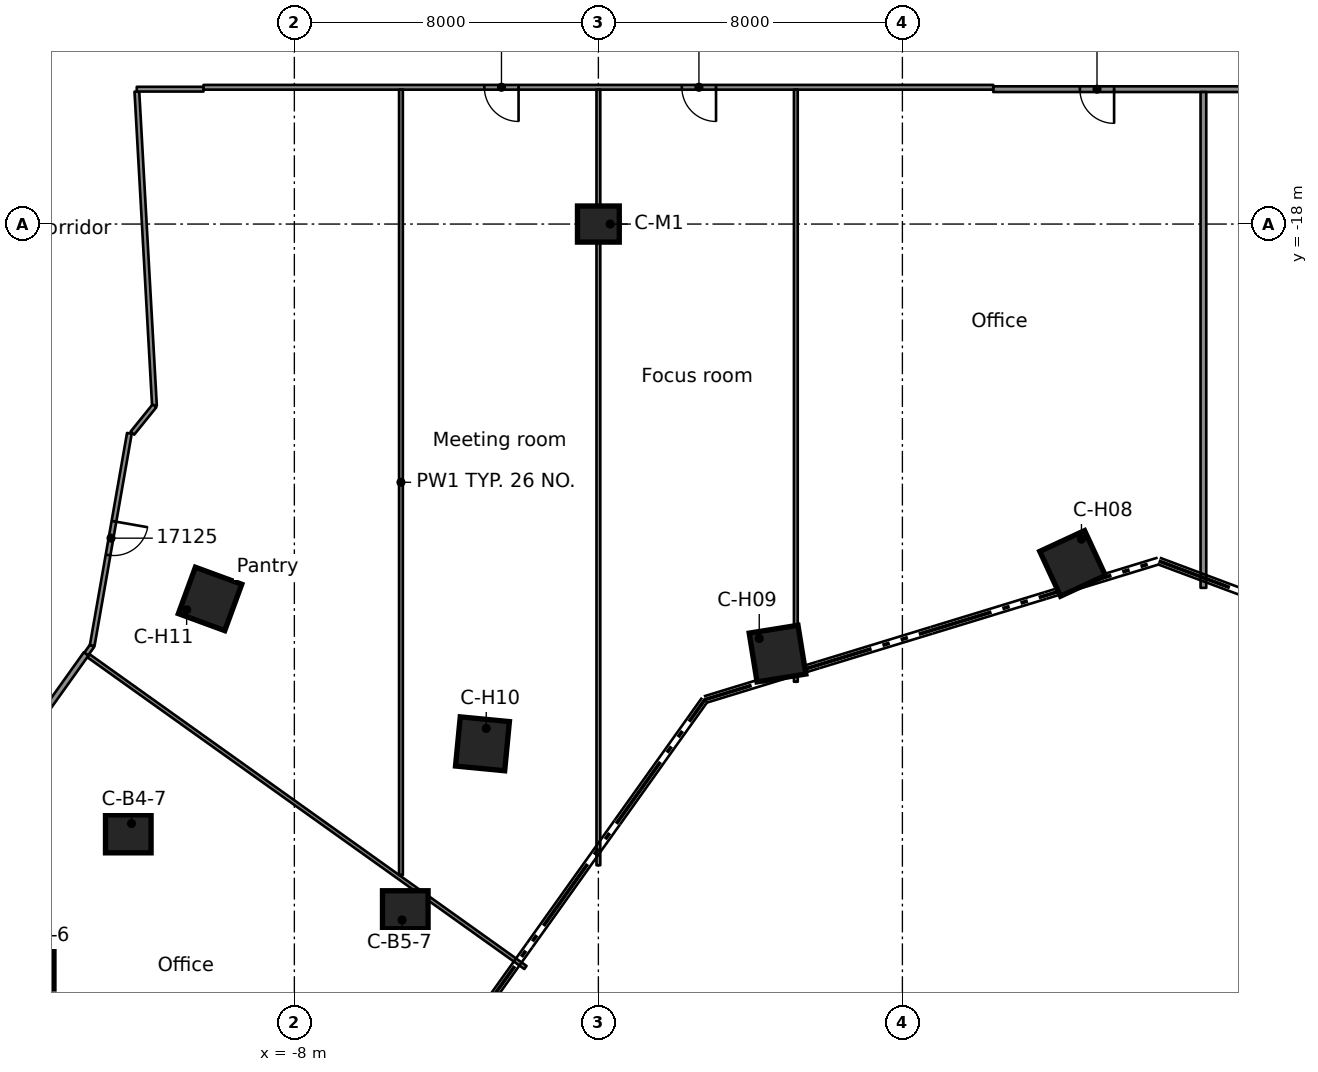
"""IFC4 building model, lengths in metres.
Left out: names, types, materials, properties, quantities, classifications, styles, units other than length and angle.
Written with IfcOpenShell. Run it as: python <this file> out.ifc"""

import sys

from ifc_helpers import new_model, si_unit, direction, frame, frame_2d, origin, origin_2d, place, context, subcontext, project, spatial, rectangle, extrude, element, fill, save


model = new_model("IFC4")
c1 = context("Model", 3, precision=1e-05, world=origin(), true_north=direction((0.0, 1.0)))
c2 = subcontext(c1, "Body", "Model", "MODEL_VIEW")
j1 = project(units=[si_unit("LENGTHUNIT", "METRE"), si_unit("PLANEANGLEUNIT", "RADIAN")], contexts=[c1])
p1 = place(None, origin())
s1 = spatial("IfcSite", under=j1, at=p1, CompositionType="ELEMENT")
p2 = place(p1, origin())
s2 = spatial("IfcBuilding", under=s1, at=p2, CompositionType="ELEMENT")
p3 = place(p2, frame((0.0, 0.0, 84.2)))
s3 = spatial("IfcBuildingStorey", under=s2, at=p3, CompositionType="ELEMENT", Elevation=84.2)
for number, where, z_axis, x_axis in (
    (1, (-14.925, -37.628, 0.0), (0.0, 0.0, 1.0), (1.0, 0.0, 0.0)),
    (2, (-12.37, -34.045, 0.0), (0.0, 0.0, 1.0), (1.0, 0.0, 0.0)),
    (3, (-5.081, -36.042, 0.0), (0.0, 0.0, 1.0), (1.0, 0.0, 0.0)),
):
    element("IfcColumn", number, at=place(p3, frame(where, z_axis=z_axis, x_axis=x_axis)), inside=s3, PredefinedType="COLUMN", context=c2, shape_type="SweptSolid", body=[
        extrude(rectangle(XDim=1.2, YDim=1.0, at=origin_2d()), origin(), (0.0, 0.0, 1.0), 3.5),
    ])
for number, where, z_axis, x_axis in (
    (4, (12.478, -26.929, 0.0), (0.0, 0.0, 1.0), (0.42, -0.907, 0.0)),
    (5, (4.714, -29.302, 0.0), (0.0, 0.0, 1.0), (0.159, -0.987, 0.0)),
    (6, (-3.05, -31.676, 0.0), (0.0, 0.0, 1.0), (-0.096, -0.995, 0.0)),
    (7, (-10.218, -27.864, 0.0), (0.0, 0.0, 1.0), (-0.344, -0.939, 0.0)),
):
    element("IfcColumn", number, at=place(p3, frame(where, z_axis=z_axis, x_axis=x_axis)), inside=s3, PredefinedType="COLUMN", context=c2, shape_type="SweptSolid", body=[
        extrude(rectangle(XDim=1.3, YDim=1.3, at=origin_2d()), origin(), (0.0, 0.0, 1.0), 3.5),
    ])
p4 = place(p3, frame((0.0, -18.0, 0.0), z_axis=(0.0, 0.0, 1.0), x_axis=(1.0, 0.0, 0.0)))
e8 = element("IfcColumn", 8, at=p4, inside=s3, PredefinedType="COLUMN", context=c2, shape_type="SweptSolid", body=[
    extrude(rectangle(XDim=1.1, YDim=0.95, at=origin_2d()), origin(), (0.0, 0.0, 1.0), 3.5),
])
p5 = place(p3, frame((-12.144, -14.513, 0.0), z_axis=(0.0, 0.0, 1.0), x_axis=(0.055914043425, -0.998435586179, 0.0)))
e9 = element("IfcWall", 9, at=p5, inside=s3, PredefinedType="PARTITIONING", context=c2, shape_type="SweptSolid", body=[
    extrude(rectangle(XDim=8.283, YDim=0.125, at=frame_2d((4.142, 0.0))), origin(), (0.0, 0.0, 1.0), 3.08),
])
p6 = place(p3, frame((-19.403, -37.75, 0.0), z_axis=(0.0, 0.0, 1.0), x_axis=(0.814124535662, -0.580690313707, 0.0)))
e10 = element("IfcWall", 10, at=p6, inside=s3, PredefinedType="PARTITIONING", context=c2, shape_type="SweptSolid", body=[
    extrude(rectangle(XDim=14.125, YDim=0.15, at=frame_2d((7.062, 0.0))), origin(), (0.0, 0.0, 1.0), 3.08),
])
p7 = place(p3, frame((-13.417, -29.359, 0.0), z_axis=(0.0, 0.0, 1.0), x_axis=(0.814093047319, -0.580734457655, 0.0)))
e11 = element("IfcWall", 11, at=p7, inside=s3, PredefinedType="PARTITIONING", context=c2, shape_type="SweptSolid", body=[
    extrude(rectangle(XDim=14.124, YDim=0.1, at=frame_2d((7.062, 0.0))), origin(), (0.0, 0.0, 1.0), 3.08),
])
p8 = place(p3, frame((-12.147, -14.451, 0.0), z_axis=(0.0, 0.0, 1.0), x_axis=(1.0, 0.0, 0.0)))
e12 = element("IfcWall", 12, at=p8, inside=s3, PredefinedType="PARTITIONING", context=c2, shape_type="SweptSolid", body=[
    extrude(rectangle(XDim=1.756, YDim=0.125, at=frame_2d((0.878, 0.0))), origin(), (0.0, 0.0, 1.0), 3.08),
])
p9 = place(p3, frame((21.375, -14.451, 0.0), z_axis=(0.0, 0.0, 1.0), x_axis=(-1.0, 0.0, 0.0)))
e13 = element("IfcWall", 13, at=p9, inside=s3, PredefinedType="PARTITIONING", context=c2, shape_type="SweptSolid", body=[
    extrude(rectangle(XDim=10.984, YDim=0.15, at=frame_2d((5.492, 0.0))), origin(), (0.0, 0.0, 1.0), 3.08),
])
p10 = place(p9, frame((7.804, 0.0, 0.0)))
e14 = element("IfcOpeningElement", 14, at=p10, cuts=e13, PredefinedType="OPENING", context=c2, shape_type="SweptSolid", body=[
    extrude(rectangle(XDim=0.9, YDim=2.1, at=frame_2d((0.45, 1.05))), frame((0.0, 0.085, 0.0), z_axis=(0.0, -1.0, 0.0), x_axis=(1.0, 0.0, 0.0)), (0.0, 0.0, 1.0), 0.17),
])
p11 = place(p9, frame((2.275, 0.0, 0.0)))
e15 = element("IfcOpeningElement", 15, at=p11, cuts=e13, PredefinedType="OPENING", context=c2, shape_type="SweptSolid", body=[
    extrude(rectangle(XDim=0.9, YDim=2.1, at=frame_2d((0.45, 1.05))), frame((0.0, 0.085, 0.0), z_axis=(0.0, -1.0, 0.0), x_axis=(1.0, 0.0, 0.0)), (0.0, 0.0, 1.0), 0.17),
])
p12 = place(p3, frame((10.391, -14.401, 0.0), z_axis=(0.0, 0.0, 1.0), x_axis=(-1.0, 0.0, 0.0)))
e16 = element("IfcWall", 16, at=p12, inside=s3, PredefinedType="PARTITIONING", context=c2, shape_type="SweptSolid", body=[
    extrude(rectangle(XDim=20.781, YDim=0.125, at=frame_2d((10.391, 0.0))), origin(), (0.0, 0.0, 1.0), 3.08),
])
p13 = place(p12, frame((12.491, 0.0, 0.0)))
e17 = element("IfcOpeningElement", 17, at=p13, cuts=e16, PredefinedType="OPENING", context=c2, shape_type="SweptSolid", body=[
    extrude(rectangle(XDim=0.9, YDim=2.1, at=frame_2d((0.45, 1.05))), frame((0.0, 0.073, 0.0), z_axis=(0.0, -1.0, 0.0), x_axis=(1.0, 0.0, 0.0)), (0.0, 0.0, 1.0), 0.145),
])
p14 = place(p12, frame((7.295, 0.0, 0.0)))
e18 = element("IfcOpeningElement", 18, at=p14, cuts=e16, PredefinedType="OPENING", context=c2, shape_type="SweptSolid", body=[
    extrude(rectangle(XDim=0.9, YDim=2.1, at=frame_2d((0.45, 1.05))), frame((0.0, 0.073, 0.0), z_axis=(0.0, -1.0, 0.0), x_axis=(1.0, 0.0, 0.0)), (0.0, 0.0, 1.0), 0.145),
])
p15 = place(p3, frame((-12.262, -23.502, 0.0), z_axis=(0.0, 0.0, 1.0), x_axis=(0.628552238649, 0.777767370934, 0.0)))
e19 = element("IfcWall", 19, at=p15, inside=s3, PredefinedType="PARTITIONING", context=c2, shape_type="SweptSolid", body=[
    extrude(rectangle(XDim=0.924, YDim=0.125, at=frame_2d((0.462, 0.0))), origin(), (0.0, 0.0, 1.0), 3.08),
])
p16 = place(p3, frame((-13.478, -29.315, 0.0), z_axis=(0.0, 0.0, 1.0), x_axis=(0.581578261401, 0.813490458374, 0.0)))
e20 = element("IfcWall", 20, at=p16, inside=s3, PredefinedType="PARTITIONING", context=c2, shape_type="SweptSolid", body=[
    extrude(rectangle(XDim=0.271, YDim=0.125, at=frame_2d((0.136, 0.0))), origin(), (0.0, 0.0, 1.0), 3.08),
])
p17 = place(p3, frame((-13.48, -29.312, 0.0), z_axis=(0.0, 0.0, 1.0), x_axis=(-0.580603145907, -0.814186702767, 0.0)))
e21 = element("IfcWall", 21, at=p17, inside=s3, PredefinedType="PARTITIONING", context=c2, shape_type="SweptSolid", body=[
    extrude(rectangle(XDim=24.809, YDim=0.15, at=frame_2d((12.404, 0.0))), origin(), (0.0, 0.0, 1.0), 3.08),
])
p18 = place(p17, frame((4.601, 0.0, 0.0)))
e22 = element("IfcOpeningElement", 22, at=p18, cuts=e21, PredefinedType="OPENING", context=c2, shape_type="SweptSolid", body=[
    extrude(rectangle(XDim=0.9, YDim=2.1, at=frame_2d((0.45, 1.05))), frame((0.0, 0.085, 0.0), z_axis=(0.0, -1.0, 0.0), x_axis=(1.0, 0.0, 0.0)), (0.0, 0.0, 1.0), 0.17),
])
p19 = place(p17, frame((13.408, 0.0, 0.0)))
e23 = element("IfcOpeningElement", 23, at=p19, cuts=e21, PredefinedType="OPENING", context=c2, shape_type="SweptSolid", body=[
    extrude(rectangle(XDim=0.9, YDim=2.1, at=frame_2d((0.45, 1.05))), frame((0.0, 0.085, 0.0), z_axis=(0.0, -1.0, 0.0), x_axis=(1.0, 0.0, 0.0)), (0.0, 0.0, 1.0), 0.17),
])
p20 = place(p17, frame((19.4, 0.0, 0.0)))
e24 = element("IfcOpeningElement", 24, at=p20, cuts=e21, PredefinedType="OPENING", context=c2, shape_type="SweptSolid", body=[
    extrude(rectangle(XDim=0.9, YDim=2.1, at=frame_2d((0.45, 1.05))), frame((0.0, 0.085, 0.0), z_axis=(0.0, -1.0, 0.0), x_axis=(1.0, 0.0, 0.0)), (0.0, 0.0, 1.0), 0.17),
])
p21 = place(p3, frame((-12.341, -23.507, 0.0), z_axis=(0.0, 0.0, 1.0), x_axis=(-0.172630951449, -0.984986575849, 0.0)))
e25 = element("IfcWall", 25, at=p21, inside=s3, PredefinedType="PARTITIONING", context=c2, shape_type="SweptSolid", body=[
    extrude(rectangle(XDim=5.671, YDim=0.125, at=frame_2d((2.835, 0.0))), origin(), (0.0, 0.0, 1.0), 3.08),
])
p22 = place(p21, frame((2.35, 0.0, 0.0)))
e26 = element("IfcOpeningElement", 26, at=p22, cuts=e25, PredefinedType="OPENING", context=c2, shape_type="SweptSolid", body=[
    extrude(rectangle(XDim=0.9, YDim=2.1, at=frame_2d((0.45, 1.05))), frame((0.0, 0.073, 0.0), z_axis=(0.0, -1.0, 0.0), x_axis=(1.0, 0.0, 0.0)), (0.0, 0.0, 1.0), 0.145),
])
p23 = place(p3, frame((15.921, -27.572, 0.0), z_axis=(0.0, 0.0, 1.0), x_axis=(0.0, 1.0, 0.0)))
e27 = element("IfcWall", 27, at=p23, inside=s3, PredefinedType="PARTITIONING", context=c2, shape_type="SweptSolid", body=[
    extrude(rectangle(XDim=13.046, YDim=0.15, at=frame_2d((6.523, 0.0))), origin(), (0.0, 0.0, 1.0), 3.08),
])
p24 = place(p3, frame((5.196, -30.043, 0.0), z_axis=(0.0, 0.0, 1.0), x_axis=(0.0, 1.0, 0.0)))
e28 = element("IfcWall", 28, at=p24, inside=s3, PredefinedType="PARTITIONING", context=c2, shape_type="SweptSolid", body=[
    extrude(rectangle(XDim=15.58, YDim=0.1, at=frame_2d((7.79, 0.0))), origin(), (0.0, 0.0, 1.0), 3.08),
])
p25 = place(p3, frame((0.0, -34.871, 0.0), z_axis=(0.0, 0.0, 1.0), x_axis=(0.0, 1.0, 0.0)))
e29 = element("IfcWall", 29, at=p25, inside=s3, PredefinedType="PARTITIONING", context=c2, shape_type="SweptSolid", body=[
    extrude(rectangle(XDim=20.408, YDim=0.1, at=frame_2d((10.204, 0.0))), origin(), (0.0, 0.0, 1.0), 3.08),
])
p26 = place(p3, frame((-5.195, -35.127, 0.0), z_axis=(0.0, 0.0, 1.0), x_axis=(0.0, 1.0, 0.0)))
e30 = element("IfcWall", 30, at=p26, inside=s3, PredefinedType="PARTITIONING", context=c2, shape_type="SweptSolid", body=[
    extrude(rectangle(XDim=20.664, YDim=0.1, at=frame_2d((10.332, 0.0))), origin(), (0.0, 0.0, 1.0), 3.08),
])
p27 = place(p22, origin())
e31 = element("IfcDoor", 31, at=p27, inside=s3, OperationType="SINGLE_SWING_LEFT", PredefinedType="DOOR", context=c2, shape_type="SweptSolid", body=[
    extrude(rectangle(XDim=0.9, YDim=2.1, at=frame_2d((0.45, 1.05))), frame((0.0, 0.025, 0.0), z_axis=(0.0, -1.0, 0.0), x_axis=(1.0, 0.0, 0.0)), (0.0, 0.0, 1.0), 0.05),
])
fill(e26, e31)
p28 = place(p13, origin())
e32 = element("IfcDoor", 32, at=p28, inside=s3, OperationType="SINGLE_SWING_RIGHT", PredefinedType="DOOR", context=c2, shape_type="SweptSolid", body=[
    extrude(rectangle(XDim=0.9, YDim=2.1, at=frame_2d((0.45, 1.05))), frame((0.0, 0.025, 0.0), z_axis=(0.0, -1.0, 0.0), x_axis=(1.0, 0.0, 0.0)), (0.0, 0.0, 1.0), 0.05),
])
fill(e17, e32)
p29 = place(p14, origin())
e33 = element("IfcDoor", 33, at=p29, inside=s3, OperationType="SINGLE_SWING_LEFT", PredefinedType="DOOR", context=c2, shape_type="SweptSolid", body=[
    extrude(rectangle(XDim=0.9, YDim=2.1, at=frame_2d((0.45, 1.05))), frame((0.0, 0.025, 0.0), z_axis=(0.0, -1.0, 0.0), x_axis=(1.0, 0.0, 0.0)), (0.0, 0.0, 1.0), 0.05),
])
fill(e18, e33)
p30 = place(p10, origin())
e34 = element("IfcDoor", 34, at=p30, inside=s3, OperationType="SINGLE_SWING_RIGHT", PredefinedType="DOOR", context=c2, shape_type="SweptSolid", body=[
    extrude(rectangle(XDim=0.9, YDim=2.1, at=frame_2d((0.45, 1.05))), frame((0.0, 0.025, 0.0), z_axis=(0.0, -1.0, 0.0), x_axis=(1.0, 0.0, 0.0)), (0.0, 0.0, 1.0), 0.05),
])
fill(e14, e34)
save(model, sys.argv[1])
